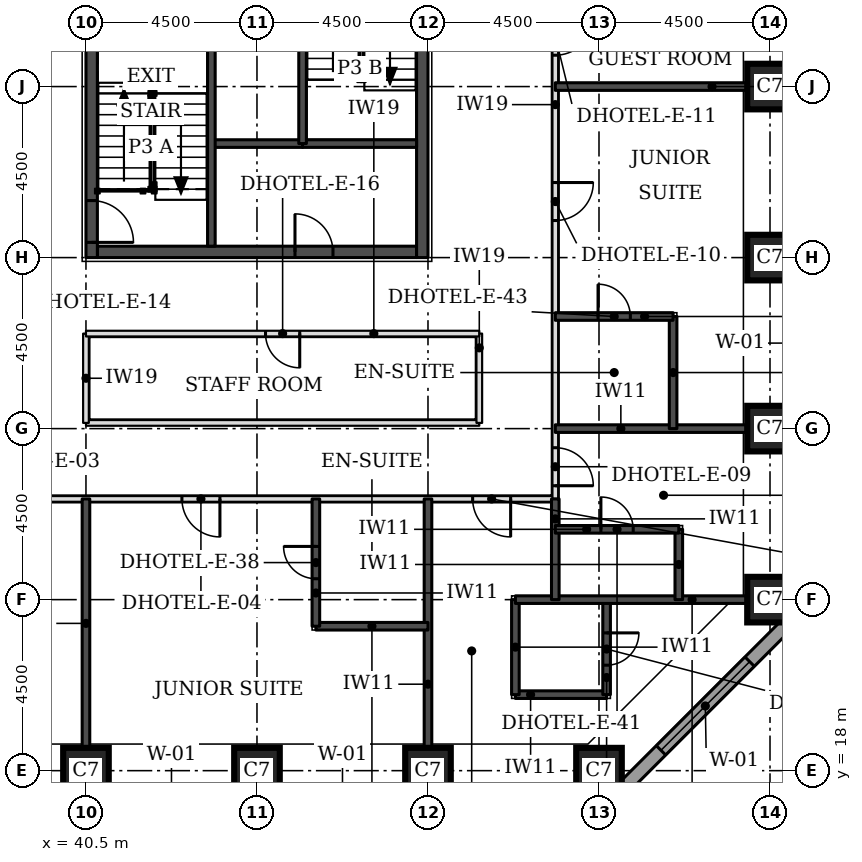
"""IFC4 building model, lengths in metres.
Left out: names, types, materials, properties, quantities, classifications, styles, units other than length and angle.
Written with IfcOpenShell. Run it as: python <this file> out.ifc"""

import sys

from ifc_helpers import new_model, si_unit, direction, frame, frame_2d, origin, origin_2d, place, context, subcontext, project, spatial, rectangle, extrude, element, fill, save


model = new_model("IFC4")
c1 = context("Model", 3, precision=1e-05, world=origin(), true_north=direction((0.0, 1.0)))
c2 = subcontext(c1, "Body", "Model", "MODEL_VIEW")
j1 = project(units=[si_unit("LENGTHUNIT", "METRE"), si_unit("PLANEANGLEUNIT", "RADIAN")], contexts=[c1])
p1 = place(None, origin())
s1 = spatial("IfcSite", under=j1, at=p1, CompositionType="ELEMENT")
p2 = place(p1, origin())
s2 = spatial("IfcBuilding", under=s1, at=p2, CompositionType="ELEMENT")
p3 = place(p2, frame((0.0, 0.0, 39.6)))
s3 = spatial("IfcBuildingStorey", under=s2, at=p3, CompositionType="ELEMENT", Elevation=39.6)
for number, where, z_axis, x_axis in (
    (1, (40.5, 18.0, 0.0), (0.0, 0.0, 1.0), (1.0, 0.0, 0.0)),
    (2, (45.0, 18.0, 0.0), (0.0, 0.0, 1.0), (1.0, 0.0, 0.0)),
    (3, (49.5, 18.0, 0.0), (0.0, 0.0, 1.0), (1.0, 0.0, 0.0)),
    (4, (54.0, 18.0, 0.0), (0.0, 0.0, 1.0), (1.0, 0.0, 0.0)),
    (5, (58.5, 22.5, 0.0), (0.0, 0.0, 1.0), (1.0, 0.0, 0.0)),
    (6, (58.5, 27.0, 0.0), (0.0, 0.0, 1.0), (1.0, 0.0, 0.0)),
    (7, (58.5, 31.5, 0.0), (0.0, 0.0, 1.0), (1.0, 0.0, 0.0)),
    (8, (58.5, 36.0, 0.0), (0.0, 0.0, 1.0), (1.0, 0.0, 0.0)),
):
    element("IfcColumn", number, at=place(p3, frame(where, z_axis=z_axis, x_axis=x_axis)), inside=s3, PredefinedType="COLUMN", context=c2, shape_type="SweptSolid", body=[
        extrude(rectangle(XDim=1.2, YDim=1.2, at=origin_2d()), origin(), (0.0, 0.0, 1.0), 3.3),
    ])
p4 = place(p3, frame((40.8, 31.65, 0.0), z_axis=(0.0, 0.0, 1.0), x_axis=(1.0, 0.0, 0.0)))
e9 = element("IfcWall", 9, at=p4, inside=s3, PredefinedType="SHEAR", context=c2, shape_type="SweptSolid", body=[
    extrude(rectangle(XDim=8.4, YDim=0.3, at=frame_2d((4.2, 0.0))), origin(), (0.0, 0.0, 1.0), 3.3),
])
p5 = place(p4, frame((5.2, 0.0, 0.0)))
e10 = element("IfcOpeningElement", 10, at=p5, cuts=e9, PredefinedType="OPENING", context=c2, shape_type="SweptSolid", body=[
    extrude(rectangle(XDim=1.0, YDim=2.1, at=frame_2d((0.5, 1.05))), frame((0.0, 0.16, 0.0), z_axis=(0.0, -1.0, 0.0), x_axis=(1.0, 0.0, 0.0)), (0.0, 0.0, 1.0), 0.32),
])
p6 = place(p3, frame((40.65, 31.5, 0.0), z_axis=(0.0, 0.0, 1.0), x_axis=(0.0, 1.0, 0.0)))
e11 = element("IfcWall", 11, at=p6, inside=s3, PredefinedType="SHEAR", context=c2, shape_type="SweptSolid", body=[
    extrude(rectangle(XDim=9.0, YDim=0.3, at=frame_2d((4.5, 0.0))), origin(), (0.0, 0.0, 1.0), 3.3),
])
p7 = place(p6, frame((0.4, 0.0, 0.0)))
e12 = element("IfcOpeningElement", 12, at=p7, cuts=e11, PredefinedType="OPENING", context=c2, shape_type="SweptSolid", body=[
    extrude(rectangle(XDim=1.1, YDim=2.1, at=frame_2d((0.55, 1.05))), frame((0.0, 0.16, 0.0), z_axis=(0.0, -1.0, 0.0), x_axis=(1.0, 0.0, 0.0)), (0.0, 0.0, 1.0), 0.32),
])
p8 = place(p3, frame((49.35, 31.5, 0.0), z_axis=(0.0, 0.0, 1.0), x_axis=(0.0, 1.0, 0.0)))
e13 = element("IfcWall", 13, at=p8, inside=s3, PredefinedType="SHEAR", context=c2, shape_type="SweptSolid", body=[
    extrude(rectangle(XDim=9.0, YDim=0.3, at=frame_2d((4.5, 0.0))), origin(), (0.0, 0.0, 1.0), 3.3),
])
p9 = place(p3, frame((54.27, 17.174, 0.0), z_axis=(0.0, 0.0, 1.0), x_axis=(0.707106781187, 0.707106781187, 0.0)))
e14 = element("IfcWall", 14, at=p9, inside=s3, PredefinedType="STANDARD", context=c2, shape_type="SweptSolid", body=[
    extrude(rectangle(XDim=7.151, YDim=0.35, at=frame_2d((3.576, 0.0))), origin(), (0.0, 0.0, 1.0), 3.055),
])
p10 = place(p9, frame((1.926, 0.0, 0.8)))
e15 = element("IfcOpeningElement", 15, at=p10, cuts=e14, PredefinedType="OPENING", context=c2, shape_type="SweptSolid", body=[
    extrude(rectangle(XDim=3.3, YDim=1.5, at=frame_2d((1.65, 0.75))), frame((0.0, 0.185, 0.0), z_axis=(0.0, -1.0, 0.0), x_axis=(1.0, 0.0, 0.0)), (0.0, 0.0, 1.0), 0.37),
])
p11 = place(p3, frame((20.65, 25.15, 0.0), z_axis=(0.0, 0.0, 1.0), x_axis=(1.0, 0.0, 0.0)))
e16 = element("IfcWall", 16, at=p11, inside=s3, PredefinedType="PARTITIONING", context=c2, shape_type="SweptSolid", body=[
    extrude(rectangle(XDim=32.2, YDim=0.15, at=frame_2d((16.1, 0.0))), origin(), (0.0, 0.0, 1.0), 3.08),
])
p12 = place(p11, frame((4.375, 0.0, 0.0)))
e17 = element("IfcOpeningElement", 17, at=p12, cuts=e16, PredefinedType="OPENING", context=c2, shape_type="SweptSolid", body=[
    extrude(rectangle(XDim=1.0, YDim=2.1, at=frame_2d((0.5, 1.05))), frame((0.0, 0.085, 0.0), z_axis=(0.0, -1.0, 0.0), x_axis=(1.0, 0.0, 0.0)), (0.0, 0.0, 1.0), 0.17),
])
p13 = place(p11, frame((16.075, 0.0, 0.0)))
e18 = element("IfcOpeningElement", 18, at=p13, cuts=e16, PredefinedType="OPENING", context=c2, shape_type="SweptSolid", body=[
    extrude(rectangle(XDim=1.0, YDim=2.1, at=frame_2d((0.5, 1.05))), frame((0.0, 0.085, 0.0), z_axis=(0.0, -1.0, 0.0), x_axis=(1.0, 0.0, 0.0)), (0.0, 0.0, 1.0), 0.17),
])
p14 = place(p11, frame((22.375, 0.0, 0.0)))
e19 = element("IfcOpeningElement", 19, at=p14, cuts=e16, PredefinedType="OPENING", context=c2, shape_type="SweptSolid", body=[
    extrude(rectangle(XDim=1.0, YDim=2.1, at=frame_2d((0.5, 1.05))), frame((0.0, 0.085, 0.0), z_axis=(0.0, -1.0, 0.0), x_axis=(1.0, 0.0, 0.0)), (0.0, 0.0, 1.0), 0.17),
])
p15 = place(p11, frame((0.425, 0.0, 0.0)))
e20 = element("IfcOpeningElement", 20, at=p15, cuts=e16, PredefinedType="OPENING", context=c2, shape_type="SweptSolid", body=[
    extrude(rectangle(XDim=1.0, YDim=2.1, at=frame_2d((0.5, 1.05))), frame((0.0, 0.085, 0.0), z_axis=(0.0, -1.0, 0.0), x_axis=(1.0, 0.0, 0.0)), (0.0, 0.0, 1.0), 0.17),
])
p16 = place(p11, frame((30.025, 0.0, 0.0)))
e21 = element("IfcOpeningElement", 21, at=p16, cuts=e16, PredefinedType="OPENING", context=c2, shape_type="SweptSolid", body=[
    extrude(rectangle(XDim=1.0, YDim=2.1, at=frame_2d((0.5, 1.05))), frame((0.0, 0.085, 0.0), z_axis=(0.0, -1.0, 0.0), x_axis=(1.0, 0.0, 0.0)), (0.0, 0.0, 1.0), 0.17),
])
p17 = place(p3, frame((52.85, 25.15, 0.0), z_axis=(0.0, 0.0, 1.0), x_axis=(0.0, 1.0, 0.0)))
e22 = element("IfcWall", 22, at=p17, inside=s3, PredefinedType="PARTITIONING", context=c2, shape_type="SweptSolid", body=[
    extrude(rectangle(XDim=22.35, YDim=0.15, at=frame_2d((11.175, 0.0))), origin(), (0.0, 0.0, 1.0), 3.08),
])
p18 = place(p17, frame((0.347, 0.0, 0.0)))
e23 = element("IfcOpeningElement", 23, at=p18, cuts=e22, PredefinedType="OPENING", context=c2, shape_type="SweptSolid", body=[
    extrude(rectangle(XDim=1.0, YDim=2.1, at=frame_2d((0.5, 1.05))), frame((0.0, 0.085, 0.0), z_axis=(0.0, -1.0, 0.0), x_axis=(1.0, 0.0, 0.0)), (0.0, 0.0, 1.0), 0.17),
])
p19 = place(p17, frame((7.325, 0.0, 0.0)))
e24 = element("IfcOpeningElement", 24, at=p19, cuts=e22, PredefinedType="OPENING", context=c2, shape_type="SweptSolid", body=[
    extrude(rectangle(XDim=1.0, YDim=2.1, at=frame_2d((0.5, 1.05))), frame((0.0, 0.085, 0.0), z_axis=(0.0, -1.0, 0.0), x_axis=(1.0, 0.0, 0.0)), (0.0, 0.0, 1.0), 0.17),
])
p20 = place(p17, frame((11.675, 0.0, 0.0)))
e25 = element("IfcOpeningElement", 25, at=p20, cuts=e22, PredefinedType="OPENING", context=c2, shape_type="SweptSolid", body=[
    extrude(rectangle(XDim=1.0, YDim=2.1, at=frame_2d((0.5, 1.05))), frame((0.0, 0.085, 0.0), z_axis=(0.0, -1.0, 0.0), x_axis=(1.0, 0.0, 0.0)), (0.0, 0.0, 1.0), 0.17),
])
p21 = place(p17, frame((18.4, 0.0, 0.0)))
e26 = element("IfcOpeningElement", 26, at=p21, cuts=e22, PredefinedType="OPENING", context=c2, shape_type="SweptSolid", body=[
    extrude(rectangle(XDim=0.9, YDim=2.1, at=frame_2d((0.45, 1.05))), frame((0.0, 0.085, 0.0), z_axis=(0.0, -1.0, 0.0), x_axis=(1.0, 0.0, 0.0)), (0.0, 0.0, 1.0), 0.17),
])
p22 = place(p3, frame((40.5, 27.15, 0.0), z_axis=(0.0, 0.0, 1.0), x_axis=(1.0, 0.0, 0.0)))
e27 = element("IfcWall", 27, at=p22, inside=s3, PredefinedType="PARTITIONING", context=c2, shape_type="SweptSolid", body=[
    extrude(rectangle(XDim=10.35, YDim=0.15, at=frame_2d((5.175, 0.0))), origin(), (0.0, 0.0, 1.0), 3.08),
])
for number, where, z_axis, x_axis in (
    (28, (40.5, 27.15, 0.0), (0.0, 0.0, 1.0), (0.0, 1.0, 0.0)),
    (29, (50.85, 27.15, 0.0), (0.0, 0.0, 1.0), (0.0, 1.0, 0.0)),
):
    element("IfcWall", number, at=place(p3, frame(where, z_axis=z_axis, x_axis=x_axis)), inside=s3, PredefinedType="PARTITIONING", context=c2, shape_type="SweptSolid", body=[
        extrude(rectangle(XDim=2.35, YDim=0.15, at=frame_2d((1.175, 0.0))), origin(), (0.0, 0.0, 1.0), 3.08),
    ])
p23 = place(p3, frame((40.5, 29.5, 0.0), z_axis=(0.0, 0.0, 1.0), x_axis=(1.0, 0.0, 0.0)))
e30 = element("IfcWall", 30, at=p23, inside=s3, PredefinedType="PARTITIONING", context=c2, shape_type="SweptSolid", body=[
    extrude(rectangle(XDim=10.35, YDim=0.15, at=frame_2d((5.175, 0.0))), origin(), (0.0, 0.0, 1.0), 3.08),
])
p24 = place(p23, frame((4.725, 0.0, 0.0)))
e31 = element("IfcOpeningElement", 31, at=p24, cuts=e30, PredefinedType="OPENING", context=c2, shape_type="SweptSolid", body=[
    extrude(rectangle(XDim=0.9, YDim=2.1, at=frame_2d((0.45, 1.05))), frame((0.0, 0.085, 0.0), z_axis=(0.0, -1.0, 0.0), x_axis=(1.0, 0.0, 0.0)), (0.0, 0.0, 1.0), 0.17),
])
for number, where, z_axis, x_axis in (
    (32, (40.5, 18.6, 0.0), (0.0, 0.0, 1.0), (0.0, 1.0, 0.0)),
    (33, (49.5, 18.6, 0.0), (0.0, 0.0, 1.0), (0.0, 1.0, 0.0)),
):
    element("IfcWall", number, at=place(p3, frame(where, z_axis=z_axis, x_axis=x_axis)), inside=s3, PredefinedType="SOLIDWALL", context=c2, shape_type="SweptSolid", body=[
        extrude(rectangle(XDim=6.55, YDim=0.2, at=frame_2d((3.275, 0.0))), origin(), (0.0, 0.0, 1.0), 3.08),
    ])
p25 = place(p3, frame((51.8, 20.0, 0.0), z_axis=(0.0, 0.0, 1.0), x_axis=(1.0, 0.0, 0.0)))
e34 = element("IfcWall", 34, at=p25, inside=s3, PredefinedType="SOLIDWALL", context=c2, shape_type="SweptSolid", body=[
    extrude(rectangle(XDim=2.4, YDim=0.2, at=frame_2d((1.2, 0.0))), origin(), (0.0, 0.0, 1.0), 3.08),
])
p26 = place(p3, frame((51.8, 20.0, 0.0), z_axis=(0.0, 0.0, 1.0), x_axis=(0.0, 1.0, 0.0)))
e35 = element("IfcWall", 35, at=p26, inside=s3, PredefinedType="SOLIDWALL", context=c2, shape_type="SweptSolid", body=[
    extrude(rectangle(XDim=2.5, YDim=0.2, at=frame_2d((1.25, 0.0))), origin(), (0.0, 0.0, 1.0), 3.08),
])
p27 = place(p3, frame((54.2, 20.0, 0.0), z_axis=(0.0, 0.0, 1.0), x_axis=(0.0, 1.0, 0.0)))
e36 = element("IfcWall", 36, at=p27, inside=s3, PredefinedType="SOLIDWALL", context=c2, shape_type="SweptSolid", body=[
    extrude(rectangle(XDim=2.5, YDim=0.2, at=frame_2d((1.25, 0.0))), origin(), (0.0, 0.0, 1.0), 3.08),
])
p28 = place(p27, frame((0.775, 0.0, 0.0)))
e37 = element("IfcOpeningElement", 37, at=p28, cuts=e36, PredefinedType="OPENING", context=c2, shape_type="SweptSolid", body=[
    extrude(rectangle(XDim=0.85, YDim=2.1, at=frame_2d((0.425, 1.05))), frame((0.0, 0.11, 0.0), z_axis=(0.0, -1.0, 0.0), x_axis=(1.0, 0.0, 0.0)), (0.0, 0.0, 1.0), 0.22),
])
p29 = place(p3, frame((46.55, 21.8, 0.0), z_axis=(0.0, 0.0, 1.0), x_axis=(1.0, 0.0, 0.0)))
e38 = element("IfcWall", 38, at=p29, inside=s3, PredefinedType="SOLIDWALL", context=c2, shape_type="SweptSolid", body=[
    extrude(rectangle(XDim=2.95, YDim=0.2, at=frame_2d((1.475, 0.0))), origin(), (0.0, 0.0, 1.0), 3.08),
])
p30 = place(p3, frame((46.55, 21.8, 0.0), z_axis=(0.0, 0.0, 1.0), x_axis=(0.0, 1.0, 0.0)))
e39 = element("IfcWall", 39, at=p30, inside=s3, PredefinedType="SOLIDWALL", context=c2, shape_type="SweptSolid", body=[
    extrude(rectangle(XDim=3.35, YDim=0.2, at=frame_2d((1.675, 0.0))), origin(), (0.0, 0.0, 1.0), 3.08),
])
p31 = place(p30, frame((1.25, 0.0, 0.0)))
e40 = element("IfcOpeningElement", 40, at=p31, cuts=e39, PredefinedType="OPENING", context=c2, shape_type="SweptSolid", body=[
    extrude(rectangle(XDim=0.85, YDim=2.1, at=frame_2d((0.425, 1.05))), frame((0.0, 0.11, 0.0), z_axis=(0.0, -1.0, 0.0), x_axis=(1.0, 0.0, 0.0)), (0.0, 0.0, 1.0), 0.22),
])
p32 = place(p3, frame((51.8, 22.5, 0.0), z_axis=(0.0, 0.0, 1.0), x_axis=(1.0, 0.0, 0.0)))
e41 = element("IfcWall", 41, at=p32, inside=s3, PredefinedType="SOLIDWALL", context=c2, shape_type="SweptSolid", body=[
    extrude(rectangle(XDim=6.1, YDim=0.2, at=frame_2d((3.05, 0.0))), origin(), (0.0, 0.0, 1.0), 3.08),
])
p33 = place(p3, frame((52.85, 22.5, 0.0), z_axis=(0.0, 0.0, 1.0), x_axis=(0.0, 1.0, 0.0)))
e42 = element("IfcWall", 42, at=p33, inside=s3, PredefinedType="SOLIDWALL", context=c2, shape_type="SweptSolid", body=[
    extrude(rectangle(XDim=2.65, YDim=0.2, at=frame_2d((1.325, 0.0))), origin(), (0.0, 0.0, 1.0), 3.08),
])
p34 = place(p3, frame((56.1, 22.5, 0.0), z_axis=(0.0, 0.0, 1.0), x_axis=(0.0, 1.0, 0.0)))
e43 = element("IfcWall", 43, at=p34, inside=s3, PredefinedType="SOLIDWALL", context=c2, shape_type="SweptSolid", body=[
    extrude(rectangle(XDim=1.85, YDim=0.2, at=frame_2d((0.925, 0.0))), origin(), (0.0, 0.0, 1.0), 3.08),
])
p35 = place(p3, frame((52.85, 24.35, 0.0), z_axis=(0.0, 0.0, 1.0), x_axis=(1.0, 0.0, 0.0)))
e44 = element("IfcWall", 44, at=p35, inside=s3, PredefinedType="SOLIDWALL", context=c2, shape_type="SweptSolid", body=[
    extrude(rectangle(XDim=3.25, YDim=0.2, at=frame_2d((1.625, 0.0))), origin(), (0.0, 0.0, 1.0), 3.08),
])
p36 = place(p35, frame((1.2, 0.0, 0.0)))
e45 = element("IfcOpeningElement", 45, at=p36, cuts=e44, PredefinedType="OPENING", context=c2, shape_type="SweptSolid", body=[
    extrude(rectangle(XDim=0.85, YDim=2.1, at=frame_2d((0.425, 1.05))), frame((0.0, 0.11, 0.0), z_axis=(0.0, -1.0, 0.0), x_axis=(1.0, 0.0, 0.0)), (0.0, 0.0, 1.0), 0.22),
])
p37 = place(p3, frame((52.85, 27.0, 0.0), z_axis=(0.0, 0.0, 1.0), x_axis=(1.0, 0.0, 0.0)))
e46 = element("IfcWall", 46, at=p37, inside=s3, PredefinedType="SOLIDWALL", context=c2, shape_type="SweptSolid", body=[
    extrude(rectangle(XDim=5.05, YDim=0.2, at=frame_2d((2.525, 0.0))), origin(), (0.0, 0.0, 1.0), 3.08),
])
p38 = place(p3, frame((55.95, 27.0, 0.0), z_axis=(0.0, 0.0, 1.0), x_axis=(0.0, 1.0, 0.0)))
e47 = element("IfcWall", 47, at=p38, inside=s3, PredefinedType="SOLIDWALL", context=c2, shape_type="SweptSolid", body=[
    extrude(rectangle(XDim=2.95, YDim=0.2, at=frame_2d((1.475, 0.0))), origin(), (0.0, 0.0, 1.0), 3.08),
])
p39 = place(p3, frame((52.85, 29.95, 0.0), z_axis=(0.0, 0.0, 1.0), x_axis=(1.0, 0.0, 0.0)))
e48 = element("IfcWall", 48, at=p39, inside=s3, PredefinedType="SOLIDWALL", context=c2, shape_type="SweptSolid", body=[
    extrude(rectangle(XDim=3.1, YDim=0.2, at=frame_2d((1.55, 0.0))), origin(), (0.0, 0.0, 1.0), 3.08),
])
p40 = place(p39, frame((1.125, 0.0, 0.0)))
e49 = element("IfcOpeningElement", 49, at=p40, cuts=e48, PredefinedType="OPENING", context=c2, shape_type="SweptSolid", body=[
    extrude(rectangle(XDim=0.85, YDim=2.1, at=frame_2d((0.425, 1.05))), frame((0.0, 0.11, 0.0), z_axis=(0.0, -1.0, 0.0), x_axis=(1.0, 0.0, 0.0)), (0.0, 0.0, 1.0), 0.22),
])
p41 = place(p3, frame((52.85, 36.0, 0.0), z_axis=(0.0, 0.0, 1.0), x_axis=(1.0, 0.0, 0.0)))
e50 = element("IfcWall", 50, at=p41, inside=s3, PredefinedType="SOLIDWALL", context=c2, shape_type="SweptSolid", body=[
    extrude(rectangle(XDim=5.05, YDim=0.2, at=frame_2d((2.525, 0.0))), origin(), (0.0, 0.0, 1.0), 3.08),
])
p42 = place(p3, frame((43.8, 34.5, 0.0), z_axis=(0.0, 0.0, 1.0), x_axis=(1.0, 0.0, 0.0)))
e51 = element("IfcWall", 51, at=p42, inside=s3, PredefinedType="SOLIDWALL", context=c2, shape_type="SweptSolid", body=[
    extrude(rectangle(XDim=2.4, YDim=0.2, at=frame_2d((1.2, 0.0))), origin(), (0.0, 0.0, 1.0), 3.08),
])
p43 = place(p3, frame((46.2, 34.5, 0.0), z_axis=(0.0, 0.0, 1.0), x_axis=(1.0, 0.0, 0.0)))
e52 = element("IfcWall", 52, at=p43, inside=s3, PredefinedType="SOLIDWALL", context=c2, shape_type="SweptSolid", body=[
    extrude(rectangle(XDim=3.0, YDim=0.2, at=frame_2d((1.5, 0.0))), origin(), (0.0, 0.0, 1.0), 3.08),
])
for number, where, z_axis, x_axis in (
    (53, (43.8, 31.8, 0.0), (0.0, 0.0, 1.0), (0.0, 1.0, 0.0)),
    (54, (46.2, 34.5, 0.0), (0.0, 0.0, 1.0), (0.0, 1.0, 0.0)),
):
    element("IfcWall", number, at=place(p3, frame(where, z_axis=z_axis, x_axis=x_axis)), inside=s3, PredefinedType="SOLIDWALL", context=c2, shape_type="SweptSolid", body=[
        extrude(rectangle(XDim=5.7, YDim=0.2, at=frame_2d((2.85, 0.0))), origin(), (0.0, 0.0, 1.0), 3.08),
    ])
p44 = place(p10, origin())
e55 = element("IfcWindow", 55, at=p44, inside=s3, PartitioningType="SINGLE_PANEL", PredefinedType="WINDOW", context=c2, shape_type="SweptSolid", body=[
    extrude(rectangle(XDim=3.3, YDim=1.5, at=frame_2d((1.65, 0.75))), frame((0.0, 0.085, 0.0), z_axis=(0.0, -1.0, 0.0), x_axis=(1.0, 0.0, 0.0)), (0.0, 0.0, 1.0), 0.06),
])
fill(e15, e55)
p45 = place(p14, frame((1.0, 0.0, 0.0), z_axis=(0.0, 0.0, 1.0), x_axis=(-1.0, 0.0, 0.0)))
e56 = element("IfcDoor", 56, at=p45, inside=s3, OperationType="SINGLE_SWING_LEFT", PredefinedType="DOOR", context=c2, shape_type="SweptSolid", body=[
    extrude(rectangle(XDim=1.0, YDim=2.1, at=frame_2d((0.5, 1.05))), frame((0.0, 0.025, 0.0), z_axis=(0.0, -1.0, 0.0), x_axis=(1.0, 0.0, 0.0)), (0.0, 0.0, 1.0), 0.05),
])
fill(e19, e56)
p46 = place(p31, origin())
e57 = element("IfcDoor", 57, at=p46, inside=s3, OperationType="SINGLE_SWING_RIGHT", PredefinedType="DOOR", context=c2, shape_type="SweptSolid", body=[
    extrude(rectangle(XDim=0.85, YDim=2.1, at=frame_2d((0.425, 1.05))), frame((0.0, 0.025, 0.0), z_axis=(0.0, -1.0, 0.0), x_axis=(1.0, 0.0, 0.0)), (0.0, 0.0, 1.0), 0.05),
])
fill(e40, e57)
p47 = place(p18, frame((1.0, 0.0, 0.0), z_axis=(0.0, 0.0, 1.0), x_axis=(-1.0, 0.0, 0.0)))
e58 = element("IfcDoor", 58, at=p47, inside=s3, OperationType="SINGLE_SWING_RIGHT", PredefinedType="DOOR", context=c2, shape_type="SweptSolid", body=[
    extrude(rectangle(XDim=1.0, YDim=2.1, at=frame_2d((0.5, 1.05))), frame((0.0, 0.025, 0.0), z_axis=(0.0, -1.0, 0.0), x_axis=(1.0, 0.0, 0.0)), (0.0, 0.0, 1.0), 0.05),
])
fill(e23, e58)
p48 = place(p36, origin())
e59 = element("IfcDoor", 59, at=p48, inside=s3, OperationType="SINGLE_SWING_LEFT", PredefinedType="DOOR", context=c2, shape_type="SweptSolid", body=[
    extrude(rectangle(XDim=0.85, YDim=2.1, at=frame_2d((0.425, 1.05))), frame((0.0, 0.025, 0.0), z_axis=(0.0, -1.0, 0.0), x_axis=(1.0, 0.0, 0.0)), (0.0, 0.0, 1.0), 0.05),
])
fill(e45, e59)
p49 = place(p19, frame((1.0, 0.0, 0.0), z_axis=(0.0, 0.0, 1.0), x_axis=(-1.0, 0.0, 0.0)))
e60 = element("IfcDoor", 60, at=p49, inside=s3, OperationType="SINGLE_SWING_LEFT", PredefinedType="DOOR", context=c2, shape_type="SweptSolid", body=[
    extrude(rectangle(XDim=1.0, YDim=2.1, at=frame_2d((0.5, 1.05))), frame((0.0, 0.025, 0.0), z_axis=(0.0, -1.0, 0.0), x_axis=(1.0, 0.0, 0.0)), (0.0, 0.0, 1.0), 0.05),
])
fill(e24, e60)
p50 = place(p40, origin())
e61 = element("IfcDoor", 61, at=p50, inside=s3, OperationType="SINGLE_SWING_LEFT", PredefinedType="DOOR", context=c2, shape_type="SweptSolid", body=[
    extrude(rectangle(XDim=0.85, YDim=2.1, at=frame_2d((0.425, 1.05))), frame((0.0, 0.025, 0.0), z_axis=(0.0, -1.0, 0.0), x_axis=(1.0, 0.0, 0.0)), (0.0, 0.0, 1.0), 0.05),
])
fill(e49, e61)
p51 = place(p20, frame((1.0, 0.0, 0.0), z_axis=(0.0, 0.0, 1.0), x_axis=(-1.0, 0.0, 0.0)))
e62 = element("IfcDoor", 62, at=p51, inside=s3, OperationType="SINGLE_SWING_LEFT", PredefinedType="DOOR", context=c2, shape_type="SweptSolid", body=[
    extrude(rectangle(XDim=1.0, YDim=2.1, at=frame_2d((0.5, 1.05))), frame((0.0, 0.025, 0.0), z_axis=(0.0, -1.0, 0.0), x_axis=(1.0, 0.0, 0.0)), (0.0, 0.0, 1.0), 0.05),
])
fill(e25, e62)
p52 = place(p16, frame((1.0, 0.0, 0.0), z_axis=(0.0, 0.0, 1.0), x_axis=(-1.0, 0.0, 0.0)))
e63 = element("IfcDoor", 63, at=p52, inside=s3, OperationType="SINGLE_SWING_LEFT", PredefinedType="DOOR", context=c2, shape_type="SweptSolid", body=[
    extrude(rectangle(XDim=1.0, YDim=2.1, at=frame_2d((0.5, 1.05))), frame((0.0, 0.025, 0.0), z_axis=(0.0, -1.0, 0.0), x_axis=(1.0, 0.0, 0.0)), (0.0, 0.0, 1.0), 0.05),
])
fill(e21, e63)
p53 = place(p28, frame((0.85, 0.0, 0.0), z_axis=(0.0, 0.0, 1.0), x_axis=(-1.0, 0.0, 0.0)))
e64 = element("IfcDoor", 64, at=p53, inside=s3, OperationType="SINGLE_SWING_LEFT", PredefinedType="DOOR", context=c2, shape_type="SweptSolid", body=[
    extrude(rectangle(XDim=0.85, YDim=2.1, at=frame_2d((0.425, 1.05))), frame((0.0, 0.025, 0.0), z_axis=(0.0, -1.0, 0.0), x_axis=(1.0, 0.0, 0.0)), (0.0, 0.0, 1.0), 0.05),
])
fill(e37, e64)
p54 = place(p24, frame((0.9, 0.0, 0.0), z_axis=(0.0, 0.0, 1.0), x_axis=(-1.0, 0.0, 0.0)))
e65 = element("IfcDoor", 65, at=p54, inside=s3, OperationType="SINGLE_SWING_LEFT", PredefinedType="DOOR", context=c2, shape_type="SweptSolid", body=[
    extrude(rectangle(XDim=0.9, YDim=2.1, at=frame_2d((0.45, 1.05))), frame((0.0, 0.025, 0.0), z_axis=(0.0, -1.0, 0.0), x_axis=(1.0, 0.0, 0.0)), (0.0, 0.0, 1.0), 0.05),
])
fill(e31, e65)
p55 = place(p7, frame((1.1, 0.0, 0.0), z_axis=(0.0, 0.0, 1.0), x_axis=(-1.0, 0.0, 0.0)))
e66 = element("IfcDoor", 66, at=p55, inside=s3, OperationType="SINGLE_SWING_RIGHT", PredefinedType="DOOR", context=c2, shape_type="SweptSolid", body=[
    extrude(rectangle(XDim=1.1, YDim=2.1, at=frame_2d((0.55, 1.05))), frame((0.0, 0.025, 0.0), z_axis=(0.0, -1.0, 0.0), x_axis=(1.0, 0.0, 0.0)), (0.0, 0.0, 1.0), 0.05),
])
fill(e12, e66)
p56 = place(p5, origin())
e67 = element("IfcDoor", 67, at=p56, inside=s3, OperationType="SINGLE_SWING_LEFT", PredefinedType="DOOR", context=c2, shape_type="SweptSolid", body=[
    extrude(rectangle(XDim=1.0, YDim=2.1, at=frame_2d((0.5, 1.05))), frame((0.0, 0.025, 0.0), z_axis=(0.0, -1.0, 0.0), x_axis=(1.0, 0.0, 0.0)), (0.0, 0.0, 1.0), 0.05),
])
fill(e10, e67)
save(model, sys.argv[1])
